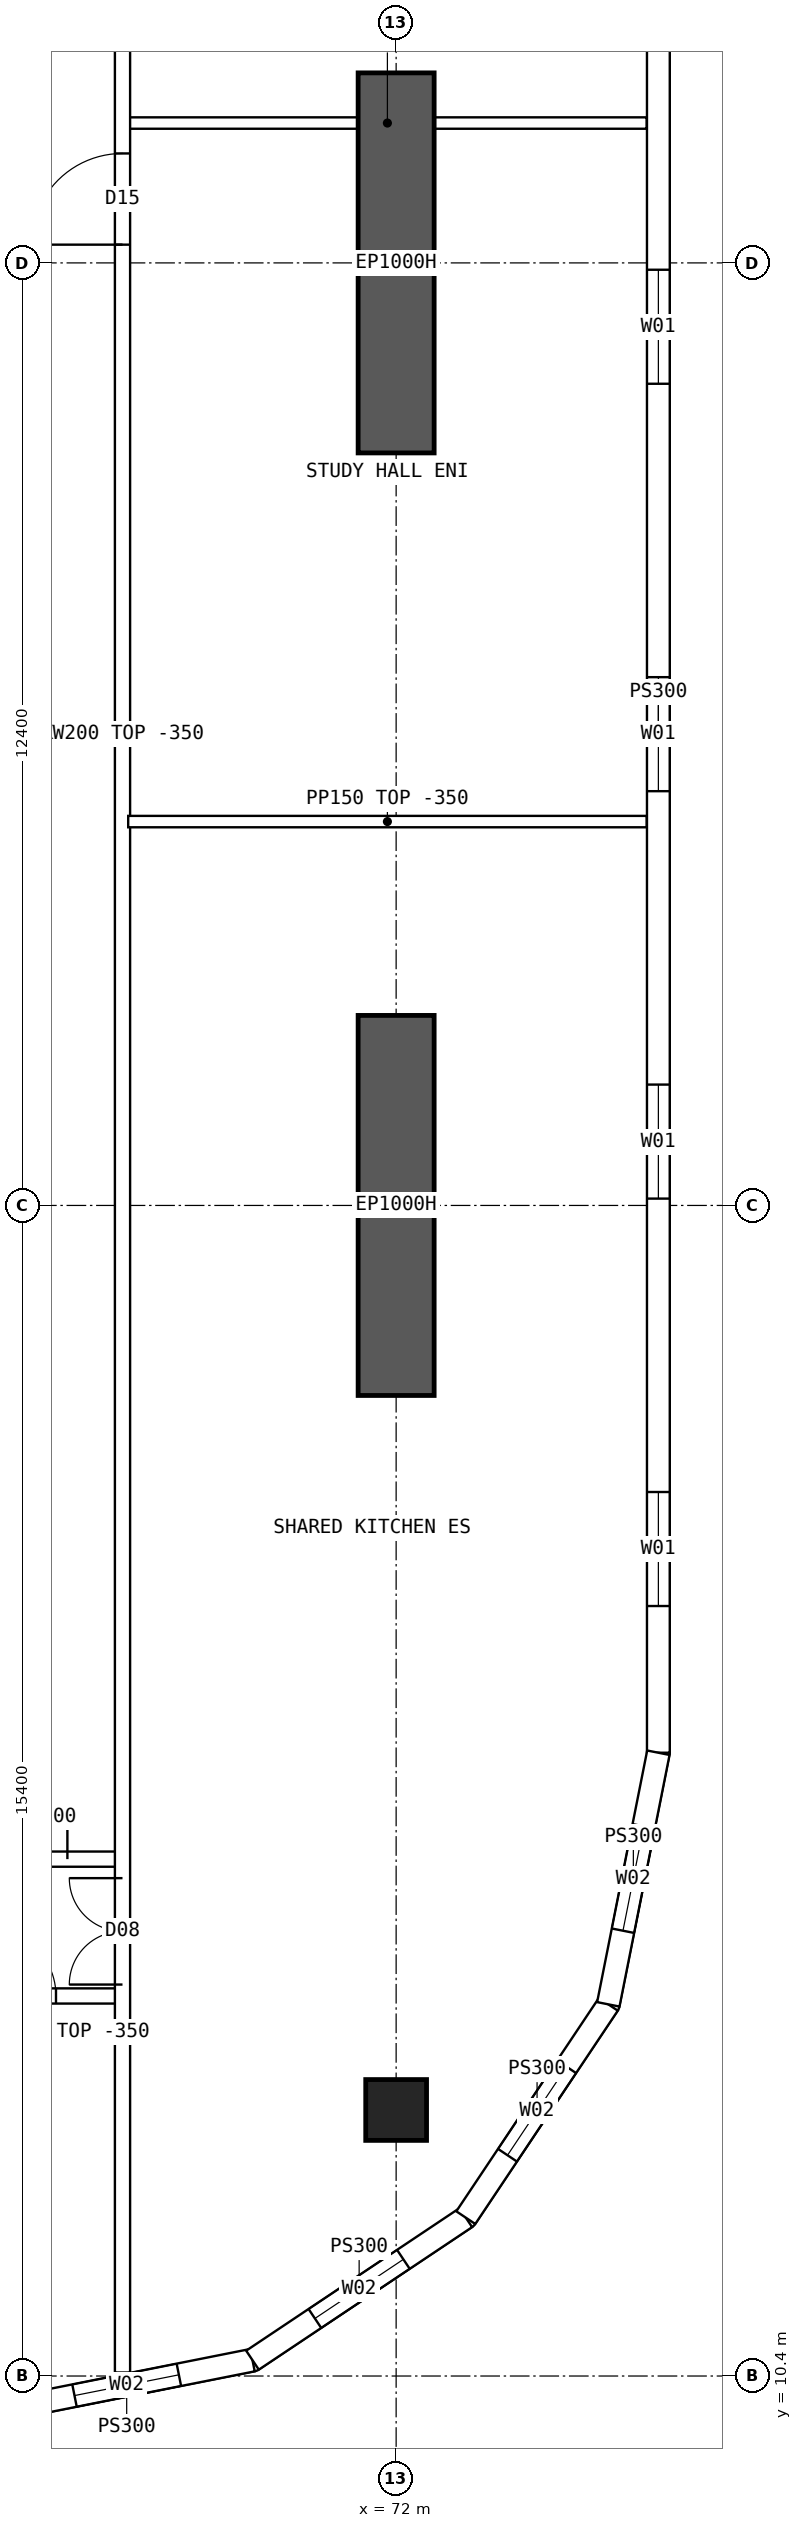
"""IFC4 building model, lengths in metres.
Left out: names, types, materials, properties, quantities, classifications, styles, units other than length and angle.
Written with IfcOpenShell. Run it as: python <this file> out.ifc"""

import sys

from ifc_helpers import new_model, si_unit, direction, frame, frame_2d, origin, origin_2d, place, context, subcontext, project, spatial, polyline, rectangle, hollow_rectangle, outline, extrude, element, fill, save


model = new_model("IFC4")
c1 = context("Model", 3, precision=1e-05, world=origin(), true_north=direction((0.0, 1.0)))
c2 = subcontext(c1, "Body", "Model", "MODEL_VIEW")
j1 = project(units=[si_unit("LENGTHUNIT", "METRE"), si_unit("PLANEANGLEUNIT", "RADIAN")], contexts=[c1])
p1 = place(None, origin())
s1 = spatial("IfcSite", under=j1, at=p1, CompositionType="ELEMENT")
p2 = place(p1, origin())
s2 = spatial("IfcBuilding", under=s1, at=p2, CompositionType="ELEMENT")
p3 = place(p2, frame((0.0, 0.0, 197.35)))
s3 = spatial("IfcBuildingStorey", under=s2, at=p3, CompositionType="ELEMENT", Elevation=197.35)
p4 = place(p3, frame((72.0, 13.9, 0.0), z_axis=(0.0, 0.0, 1.0), x_axis=(1.0, 0.0, 0.0)))
e1 = element("IfcColumn", 1, at=p4, inside=s3, PredefinedType="COLUMN", context=c2, shape_type="SweptSolid", body=[
    extrude(hollow_rectangle(XDim=0.8, YDim=0.8, WallThickness=0.08, at=origin_2d()), origin(), (0.0, 0.0, 1.0), 3.75),
])
for number, where, z_axis, x_axis in (
    (2, (72.0, 23.3, 0.0), (0.0, 0.0, 1.0), (0.0, 1.0, 0.0)),
    (3, (72.0, 35.7, 0.0), (0.0, 0.0, 1.0), (0.0, 1.0, 0.0)),
):
    element("IfcWall", number, at=place(p3, frame(where, z_axis=z_axis, x_axis=x_axis)), inside=s3, PredefinedType="SHEAR", context=c2, shape_type="SweptSolid", body=[
        extrude(rectangle(XDim=5.0, YDim=1.0, at=frame_2d((2.5, 0.0))), origin(), (0.0, 0.0, 1.0), 3.75),
    ])
p5 = place(p3, frame((75.45, 18.6, 0.0), z_axis=(0.0, 0.0, 1.0), x_axis=(0.0, 1.0, 0.0)))
e4 = element("IfcWall", 4, at=p5, inside=s3, PredefinedType="SOLIDWALL", context=c2, shape_type="SweptSolid", body=[
    extrude(outline(polyline([(-0.015, -0.15), (26.815, -0.15), (26.785, 0.15), (0.015, 0.15), (-0.015, -0.15)])), origin(), (0.0, 0.0, 1.0), 3.4),
])
p6 = place(p5, frame((1.93, 0.0, 0.9)))
e5 = element("IfcOpeningElement", 5, at=p6, cuts=e4, PredefinedType="OPENING", context=c2, shape_type="SweptSolid", body=[
    extrude(rectangle(XDim=1.5, YDim=2.0, at=frame_2d((0.75, 1.0))), frame((0.0, 0.16, 0.0), z_axis=(0.0, -1.0, 0.0), x_axis=(1.0, 0.0, 0.0)), (0.0, 0.0, 1.0), 0.32),
])
p7 = place(p5, frame((7.29, 0.0, 0.9)))
e6 = element("IfcOpeningElement", 6, at=p7, cuts=e4, PredefinedType="OPENING", context=c2, shape_type="SweptSolid", body=[
    extrude(rectangle(XDim=1.5, YDim=2.0, at=frame_2d((0.75, 1.0))), frame((0.0, 0.16, 0.0), z_axis=(0.0, -1.0, 0.0), x_axis=(1.0, 0.0, 0.0)), (0.0, 0.0, 1.0), 0.32),
])
p8 = place(p5, frame((12.65, 0.0, 0.9)))
e7 = element("IfcOpeningElement", 7, at=p8, cuts=e4, PredefinedType="OPENING", context=c2, shape_type="SweptSolid", body=[
    extrude(rectangle(XDim=1.5, YDim=2.0, at=frame_2d((0.75, 1.0))), frame((0.0, 0.16, 0.0), z_axis=(0.0, -1.0, 0.0), x_axis=(1.0, 0.0, 0.0)), (0.0, 0.0, 1.0), 0.32),
])
p9 = place(p5, frame((18.01, 0.0, 0.9)))
e8 = element("IfcOpeningElement", 8, at=p9, cuts=e4, PredefinedType="OPENING", context=c2, shape_type="SweptSolid", body=[
    extrude(rectangle(XDim=1.5, YDim=2.0, at=frame_2d((0.75, 1.0))), frame((0.0, 0.16, 0.0), z_axis=(0.0, -1.0, 0.0), x_axis=(1.0, 0.0, 0.0)), (0.0, 0.0, 1.0), 0.32),
])
p10 = place(p5, frame((23.37, 0.0, 0.9)))
e9 = element("IfcOpeningElement", 9, at=p10, cuts=e4, PredefinedType="OPENING", context=c2, shape_type="SweptSolid", body=[
    extrude(rectangle(XDim=1.5, YDim=2.0, at=frame_2d((0.75, 1.0))), frame((0.0, 0.16, 0.0), z_axis=(0.0, -1.0, 0.0), x_axis=(1.0, 0.0, 0.0)), (0.0, 0.0, 1.0), 0.32),
])
p11 = place(p3, frame((66.8, 9.95, 0.0), z_axis=(0.0, 0.0, 1.0), x_axis=(0.98078325777, 0.195100490205, 0.0)))
e10 = element("IfcWall", 10, at=p11, inside=s3, PredefinedType="SOLIDWALL", context=c2, shape_type="SweptSolid", body=[
    extrude(outline(polyline([(-0.03, -0.15), (3.405, -0.15), (3.345, 0.15), (0.03, 0.15), (-0.03, -0.15)])), origin(), (0.0, 0.0, 1.0), 3.4),
])
p12 = place(p11, frame((0.988, 0.0, 0.9)))
e11 = element("IfcOpeningElement", 11, at=p12, cuts=e10, PredefinedType="OPENING", context=c2, shape_type="SweptSolid", body=[
    extrude(rectangle(XDim=1.4, YDim=1.8, at=frame_2d((0.7, 0.9))), frame((0.0, 0.16, 0.0), z_axis=(0.0, -1.0, 0.0), x_axis=(1.0, 0.0, 0.0)), (0.0, 0.0, 1.0), 0.32),
])
p13 = place(p3, frame((70.11, 10.608, 0.0), z_axis=(0.0, 0.0, 1.0), x_axis=(0.831493450887, 0.555534554399, 0.0)))
e12 = element("IfcWall", 12, at=p13, inside=s3, PredefinedType="SOLIDWALL", context=c2, shape_type="SweptSolid", body=[
    extrude(outline(polyline([(-0.03, -0.15), (3.405, -0.15), (3.345, 0.15), (0.03, 0.15), (-0.03, -0.15)])), origin(), (0.0, 0.0, 1.0), 3.4),
])
p14 = place(p13, frame((0.988, 0.0, 0.9)))
e13 = element("IfcOpeningElement", 13, at=p14, cuts=e12, PredefinedType="OPENING", context=c2, shape_type="SweptSolid", body=[
    extrude(rectangle(XDim=1.4, YDim=1.8, at=frame_2d((0.7, 0.9))), frame((0.0, 0.16, 0.0), z_axis=(0.0, -1.0, 0.0), x_axis=(1.0, 0.0, 0.0)), (0.0, 0.0, 1.0), 0.32),
])
p15 = place(p3, frame((72.917, 12.483, 0.0), z_axis=(0.0, 0.0, 1.0), x_axis=(0.555534554399, 0.831493450887, 0.0)))
e14 = element("IfcWall", 14, at=p15, inside=s3, PredefinedType="SOLIDWALL", context=c2, shape_type="SweptSolid", body=[
    extrude(outline(polyline([(-0.03, -0.15), (3.405, -0.15), (3.345, 0.15), (0.03, 0.15), (-0.03, -0.15)])), origin(), (0.0, 0.0, 1.0), 3.4),
])
p16 = place(p15, frame((0.988, 0.0, 0.9)))
e15 = element("IfcOpeningElement", 15, at=p16, cuts=e14, PredefinedType="OPENING", context=c2, shape_type="SweptSolid", body=[
    extrude(rectangle(XDim=1.4, YDim=1.8, at=frame_2d((0.7, 0.9))), frame((0.0, 0.16, 0.0), z_axis=(0.0, -1.0, 0.0), x_axis=(1.0, 0.0, 0.0)), (0.0, 0.0, 1.0), 0.32),
])
p17 = place(p3, frame((74.792, 15.29, 0.0), z_axis=(0.0, 0.0, 1.0), x_axis=(0.19508664885, 0.980786011034, 0.0)))
e16 = element("IfcWall", 16, at=p17, inside=s3, PredefinedType="SOLIDWALL", context=c2, shape_type="SweptSolid", body=[
    extrude(outline(polyline([(-0.03, -0.15), (3.39, -0.15), (3.36, 0.15), (0.03, 0.15), (-0.03, -0.15)])), origin(), (0.0, 0.0, 1.0), 3.4),
])
p18 = place(p17, frame((0.988, 0.0, 0.9)))
e17 = element("IfcOpeningElement", 17, at=p18, cuts=e16, PredefinedType="OPENING", context=c2, shape_type="SweptSolid", body=[
    extrude(rectangle(XDim=1.4, YDim=1.8, at=frame_2d((0.7, 0.9))), frame((0.0, 0.16, 0.0), z_axis=(0.0, -1.0, 0.0), x_axis=(1.0, 0.0, 0.0)), (0.0, 0.0, 1.0), 0.32),
])
p19 = place(p3, frame((66.425, 15.4, 0.0), z_axis=(0.0, 0.0, 1.0), x_axis=(1.0, 0.0, 0.0)))
e18 = element("IfcWall", 18, at=p19, inside=s3, PredefinedType="SOLIDWALL", context=c2, shape_type="SweptSolid", body=[
    extrude(rectangle(XDim=1.975, YDim=0.2, at=frame_2d((0.987, 0.0))), origin(), (0.0, 0.0, 1.0), 3.4),
])
p20 = place(p19, frame((0.2, 0.0, 0.0)))
e19 = element("IfcOpeningElement", 19, at=p20, cuts=e18, PredefinedType="OPENING", context=c2, shape_type="SweptSolid", body=[
    extrude(rectangle(XDim=0.9, YDim=2.1, at=frame_2d((0.45, 1.05))), frame((0.0, 0.11, 0.0), z_axis=(0.0, -1.0, 0.0), x_axis=(1.0, 0.0, 0.0)), (0.0, 0.0, 1.0), 0.22),
])
p21 = place(p3, frame((66.425, 17.2, 0.0), z_axis=(0.0, 0.0, 1.0), x_axis=(1.0, 0.0, 0.0)))
e20 = element("IfcWall", 20, at=p21, inside=s3, PredefinedType="SOLIDWALL", context=c2, shape_type="SweptSolid", body=[
    extrude(rectangle(XDim=1.975, YDim=0.2, at=frame_2d((0.987, 0.0))), origin(), (0.0, 0.0, 1.0), 3.4),
])
p22 = place(p21, frame((0.05, 0.0, 0.0)))
e21 = element("IfcOpeningElement", 21, at=p22, cuts=e20, PredefinedType="OPENING", context=c2, shape_type="SweptSolid", body=[
    extrude(rectangle(XDim=1.2, YDim=2.1, at=frame_2d((0.6, 1.05))), frame((0.0, 0.11, 0.0), z_axis=(0.0, -1.0, 0.0), x_axis=(1.0, 0.0, 0.0)), (0.0, 0.0, 1.0), 0.22),
])
p23 = place(p3, frame((68.475, 30.85, 0.0), z_axis=(0.0, 0.0, 1.0), x_axis=(1.0, 0.0, 0.0)))
e22 = element("IfcWall", 22, at=p23, inside=s3, PredefinedType="PARTITIONING", context=c2, shape_type="SweptSolid", body=[
    extrude(outline(polyline([(0.0, 0.0), (6.82, 0.0), (6.82, 3.4), (3.827, 3.4), (3.825, 2.95), (3.227, 2.95), (3.225, 3.4), (0.0, 3.4), (0.0, 0.0)])), frame((0.0, 0.075, 0.0), z_axis=(0.0, -1.0, 0.0), x_axis=(1.0, 0.0, 0.0)), (0.0, 0.0, 1.0), 0.15),
])
p24 = place(p3, frame((68.4, 10.446, 0.0), z_axis=(0.0, 0.0, 1.0), x_axis=(0.0, 1.0, 0.0)))
e23 = element("IfcWall", 23, at=p24, inside=s3, PredefinedType="SOLIDWALL", context=c2, shape_type="SweptSolid", body=[
    extrude(rectangle(XDim=43.107, YDim=0.2, at=frame_2d((21.554, 0.0))), origin(), (0.0, 0.0, 1.0), 3.4),
])
p25 = place(p24, frame((27.994, 0.0, 0.0)))
e24 = element("IfcOpeningElement", 24, at=p25, cuts=e23, PredefinedType="OPENING", context=c2, shape_type="SweptSolid", body=[
    extrude(rectangle(XDim=1.2, YDim=2.1, at=frame_2d((0.6, 1.05))), frame((0.0, 0.11, 0.0), z_axis=(0.0, -1.0, 0.0), x_axis=(1.0, 0.0, 0.0)), (0.0, 0.0, 1.0), 0.22),
])
p26 = place(p24, frame((5.104, 0.0, 0.0)))
e25 = element("IfcOpeningElement", 25, at=p26, cuts=e23, PredefinedType="OPENING", context=c2, shape_type="SweptSolid", body=[
    extrude(rectangle(XDim=1.4, YDim=2.1, at=frame_2d((0.7, 1.05))), frame((0.0, 0.11, 0.0), z_axis=(0.0, -1.0, 0.0), x_axis=(1.0, 0.0, 0.0)), (0.0, 0.0, 1.0), 0.22),
])
p27 = place(p24, frame((36.504, 0.0, 0.0)))
e26 = element("IfcOpeningElement", 26, at=p27, cuts=e23, PredefinedType="OPENING", context=c2, shape_type="SweptSolid", body=[
    extrude(rectangle(XDim=1.4, YDim=2.1, at=frame_2d((0.7, 1.05))), frame((0.0, 0.11, 0.0), z_axis=(0.0, -1.0, 0.0), x_axis=(1.0, 0.0, 0.0)), (0.0, 0.0, 1.0), 0.22),
])
p28 = place(p3, frame((68.475, 40.04, 0.0), z_axis=(0.0, 0.0, 1.0), x_axis=(1.0, 0.0, 0.0)))
e27 = element("IfcWall", 27, at=p28, inside=s3, PredefinedType="PARTITIONING", context=c2, shape_type="SweptSolid", body=[
    extrude(rectangle(XDim=6.82, YDim=0.15, at=frame_2d((3.41, 0.0))), origin(), (0.0, 0.0, 1.0), 3.4),
])
p29 = place(p6, origin())
e28 = element("IfcWindow", 28, at=p29, inside=s3, PartitioningType="SINGLE_PANEL", PredefinedType="WINDOW", context=c2, shape_type="SweptSolid", body=[
    extrude(rectangle(XDim=1.5, YDim=2.0, at=frame_2d((0.75, 1.0))), frame((0.0, 0.03, 0.0), z_axis=(0.0, -1.0, 0.0), x_axis=(1.0, 0.0, 0.0)), (0.0, 0.0, 1.0), 0.06),
])
fill(e5, e28)
p30 = place(p7, origin())
e29 = element("IfcWindow", 29, at=p30, inside=s3, PartitioningType="SINGLE_PANEL", PredefinedType="WINDOW", context=c2, shape_type="SweptSolid", body=[
    extrude(rectangle(XDim=1.5, YDim=2.0, at=frame_2d((0.75, 1.0))), frame((0.0, 0.03, 0.0), z_axis=(0.0, -1.0, 0.0), x_axis=(1.0, 0.0, 0.0)), (0.0, 0.0, 1.0), 0.06),
])
fill(e6, e29)
p31 = place(p8, origin())
e30 = element("IfcWindow", 30, at=p31, inside=s3, PartitioningType="SINGLE_PANEL", PredefinedType="WINDOW", context=c2, shape_type="SweptSolid", body=[
    extrude(rectangle(XDim=1.5, YDim=2.0, at=frame_2d((0.75, 1.0))), frame((0.0, 0.03, 0.0), z_axis=(0.0, -1.0, 0.0), x_axis=(1.0, 0.0, 0.0)), (0.0, 0.0, 1.0), 0.06),
])
fill(e7, e30)
p32 = place(p9, origin())
e31 = element("IfcWindow", 31, at=p32, inside=s3, PartitioningType="SINGLE_PANEL", PredefinedType="WINDOW", context=c2, shape_type="SweptSolid", body=[
    extrude(rectangle(XDim=1.5, YDim=2.0, at=frame_2d((0.75, 1.0))), frame((0.0, 0.03, 0.0), z_axis=(0.0, -1.0, 0.0), x_axis=(1.0, 0.0, 0.0)), (0.0, 0.0, 1.0), 0.06),
])
fill(e8, e31)
p33 = place(p12, origin())
e32 = element("IfcWindow", 32, at=p33, inside=s3, PartitioningType="SINGLE_PANEL", PredefinedType="WINDOW", context=c2, shape_type="SweptSolid", body=[
    extrude(rectangle(XDim=1.4, YDim=1.8, at=frame_2d((0.7, 0.9))), frame((0.0, 0.03, 0.0), z_axis=(0.0, -1.0, 0.0), x_axis=(1.0, 0.0, 0.0)), (0.0, 0.0, 1.0), 0.06),
])
fill(e11, e32)
p34 = place(p14, origin())
e33 = element("IfcWindow", 33, at=p34, inside=s3, PartitioningType="SINGLE_PANEL", PredefinedType="WINDOW", context=c2, shape_type="SweptSolid", body=[
    extrude(rectangle(XDim=1.4, YDim=1.8, at=frame_2d((0.7, 0.9))), frame((0.0, 0.03, 0.0), z_axis=(0.0, -1.0, 0.0), x_axis=(1.0, 0.0, 0.0)), (0.0, 0.0, 1.0), 0.06),
])
fill(e13, e33)
p35 = place(p16, origin())
e34 = element("IfcWindow", 34, at=p35, inside=s3, PartitioningType="SINGLE_PANEL", PredefinedType="WINDOW", context=c2, shape_type="SweptSolid", body=[
    extrude(rectangle(XDim=1.4, YDim=1.8, at=frame_2d((0.7, 0.9))), frame((0.0, 0.03, 0.0), z_axis=(0.0, -1.0, 0.0), x_axis=(1.0, 0.0, 0.0)), (0.0, 0.0, 1.0), 0.06),
])
fill(e15, e34)
p36 = place(p18, origin())
e35 = element("IfcWindow", 35, at=p36, inside=s3, PartitioningType="SINGLE_PANEL", PredefinedType="WINDOW", context=c2, shape_type="SweptSolid", body=[
    extrude(rectangle(XDim=1.4, YDim=1.8, at=frame_2d((0.7, 0.9))), frame((0.0, 0.03, 0.0), z_axis=(0.0, -1.0, 0.0), x_axis=(1.0, 0.0, 0.0)), (0.0, 0.0, 1.0), 0.06),
])
fill(e17, e35)
p37 = place(p22, origin())
e36 = element("IfcDoor", 36, at=p37, inside=s3, OperationType="DOUBLE_DOOR_SINGLE_SWING", PredefinedType="DOOR", context=c2, shape_type="SweptSolid", body=[
    extrude(rectangle(XDim=1.2, YDim=2.1, at=frame_2d((0.6, 1.05))), frame((0.0, 0.025, 0.0), z_axis=(0.0, -1.0, 0.0), x_axis=(1.0, 0.0, 0.0)), (0.0, 0.0, 1.0), 0.05),
])
fill(e21, e36)
p38 = place(p25, origin())
e37 = element("IfcDoor", 37, at=p38, inside=s3, OperationType="SINGLE_SWING_LEFT", PredefinedType="DOOR", context=c2, shape_type="SweptSolid", body=[
    extrude(rectangle(XDim=1.2, YDim=2.1, at=frame_2d((0.6, 1.05))), frame((0.0, 0.025, 0.0), z_axis=(0.0, -1.0, 0.0), x_axis=(1.0, 0.0, 0.0)), (0.0, 0.0, 1.0), 0.05),
])
fill(e24, e37)
p39 = place(p26, origin())
e38 = element("IfcDoor", 38, at=p39, inside=s3, OperationType="DOUBLE_DOOR_SINGLE_SWING", PredefinedType="DOOR", context=c2, shape_type="SweptSolid", body=[
    extrude(rectangle(XDim=1.4, YDim=2.1, at=frame_2d((0.7, 1.05))), frame((0.0, 0.025, 0.0), z_axis=(0.0, -1.0, 0.0), x_axis=(1.0, 0.0, 0.0)), (0.0, 0.0, 1.0), 0.05),
])
fill(e25, e38)
p40 = place(p20, origin())
e39 = element("IfcDoor", 39, at=p40, inside=s3, OperationType="SINGLE_SWING_LEFT", PredefinedType="DOOR", context=c2, shape_type="SweptSolid", body=[
    extrude(rectangle(XDim=0.9, YDim=2.1, at=frame_2d((0.45, 1.05))), frame((0.0, 0.025, 0.0), z_axis=(0.0, -1.0, 0.0), x_axis=(1.0, 0.0, 0.0)), (0.0, 0.0, 1.0), 0.05),
])
fill(e19, e39)
save(model, sys.argv[1])
